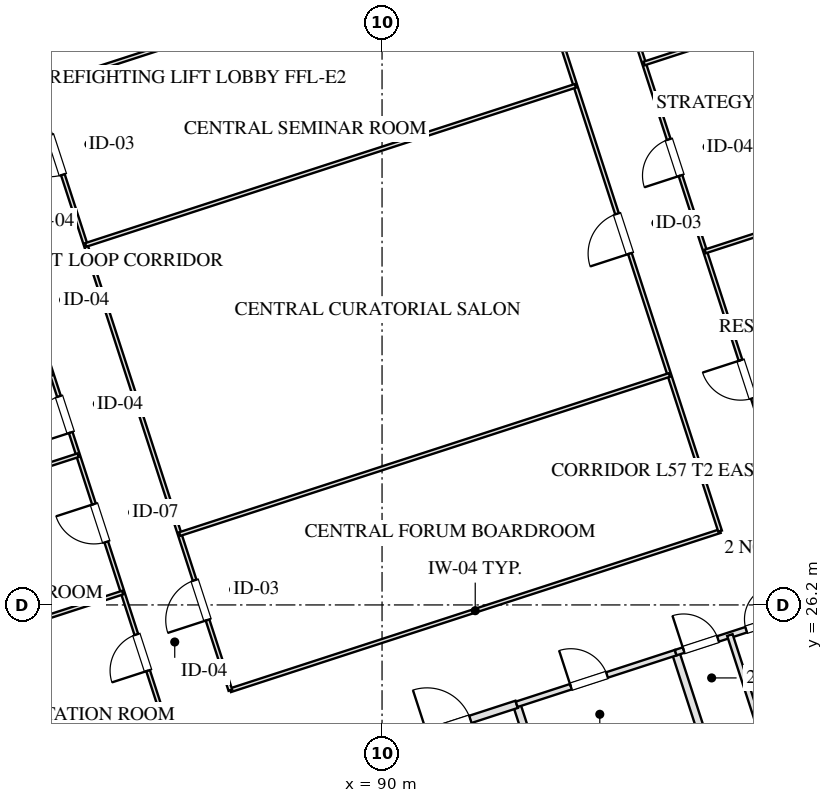
"""IFC4 building model, lengths in metres.
Left out: names, types, materials, properties, quantities, classifications, styles, units other than length and angle.
Written with IfcOpenShell. Run it as: python <this file> out.ifc"""

import sys

from ifc_helpers import new_model, si_unit, direction, frame, frame_2d, origin, place, context, subcontext, project, spatial, rectangle, extrude, element, fill, save


model = new_model("IFC4")
c1 = context("Model", 3, precision=1e-05, world=origin(), true_north=direction((0.0, 1.0)))
c2 = subcontext(c1, "Body", "Model", "MODEL_VIEW")
j1 = project(units=[si_unit("LENGTHUNIT", "METRE"), si_unit("PLANEANGLEUNIT", "RADIAN")], contexts=[c1])
p1 = place(None, origin())
s1 = spatial("IfcSite", under=j1, at=p1, CompositionType="ELEMENT")
p2 = place(p1, origin())
s2 = spatial("IfcBuilding", under=s1, at=p2, CompositionType="ELEMENT")
p3 = place(p2, frame((0.0, 0.0, 212.75)))
s3 = spatial("IfcBuildingStorey", under=s2, at=p3, CompositionType="ELEMENT", Elevation=212.75)
p4 = place(p3, frame((82.618, 11.414, 0.0), z_axis=(0.0, 0.0, 1.0), x_axis=(-0.309016491071, 0.951056679828, 0.0)))
e1 = element("IfcWall", 1, at=p4, inside=s3, PredefinedType="SOLIDWALL", context=c2, shape_type="SweptSolid", body=[
    extrude(rectangle(XDim=38.4, YDim=0.4, at=frame_2d((19.2, 0.0))), origin(), (0.0, 0.0, 1.0), 2.55),
])
p5 = place(p4, frame((11.75, 0.0, 0.75)))
e2 = element("IfcOpeningElement", 2, at=p5, cuts=e1, PredefinedType="OPENING", context=c2, shape_type="SweptSolid", body=[
    extrude(rectangle(XDim=2.1, YDim=1.4, at=frame_2d((1.05, 0.7))), frame((0.0, 0.21, 0.0), z_axis=(0.0, -1.0, 0.0), x_axis=(1.0, 0.0, 0.0)), (0.0, 0.0, 1.0), 0.42),
])
p6 = place(p4, frame((15.55, 0.0, 0.75)))
e3 = element("IfcOpeningElement", 3, at=p6, cuts=e1, PredefinedType="OPENING", context=c2, shape_type="SweptSolid", body=[
    extrude(rectangle(XDim=2.1, YDim=1.4, at=frame_2d((1.05, 0.7))), frame((0.0, 0.21, 0.0), z_axis=(0.0, -1.0, 0.0), x_axis=(1.0, 0.0, 0.0)), (0.0, 0.0, 1.0), 0.42),
])
p7 = place(p4, frame((20.75, 0.0, 0.75)))
e4 = element("IfcOpeningElement", 4, at=p7, cuts=e1, PredefinedType="OPENING", context=c2, shape_type="SweptSolid", body=[
    extrude(rectangle(XDim=2.1, YDim=1.4, at=frame_2d((1.05, 0.7))), frame((0.0, 0.21, 0.0), z_axis=(0.0, -1.0, 0.0), x_axis=(1.0, 0.0, 0.0)), (0.0, 0.0, 1.0), 0.42),
])
p8 = place(p4, frame((24.55, 0.0, 0.75)))
e5 = element("IfcOpeningElement", 5, at=p8, cuts=e1, PredefinedType="OPENING", context=c2, shape_type="SweptSolid", body=[
    extrude(rectangle(XDim=2.1, YDim=1.4, at=frame_2d((1.05, 0.7))), frame((0.0, 0.21, 0.0), z_axis=(0.0, -1.0, 0.0), x_axis=(1.0, 0.0, 0.0)), (0.0, 0.0, 1.0), 0.42),
])
p9 = place(p3, frame((97.382, 56.586, 0.0), z_axis=(0.0, 0.0, 1.0), x_axis=(0.309016491071, -0.951056679828, 0.0)))
e6 = element("IfcWall", 6, at=p9, inside=s3, PredefinedType="SOLIDWALL", context=c2, shape_type="SweptSolid", body=[
    extrude(rectangle(XDim=38.4, YDim=0.4, at=frame_2d((19.2, 0.0))), origin(), (0.0, 0.0, 1.0), 2.55),
])
p10 = place(p9, frame((24.55, 0.0, 0.75)))
e7 = element("IfcOpeningElement", 7, at=p10, cuts=e6, PredefinedType="OPENING", context=c2, shape_type="SweptSolid", body=[
    extrude(rectangle(XDim=2.1, YDim=1.4, at=frame_2d((1.05, 0.7))), frame((0.0, 0.21, 0.0), z_axis=(0.0, -1.0, 0.0), x_axis=(1.0, 0.0, 0.0)), (0.0, 0.0, 1.0), 0.42),
])
p11 = place(p9, frame((20.75, 0.0, 0.75)))
e8 = element("IfcOpeningElement", 8, at=p11, cuts=e6, PredefinedType="OPENING", context=c2, shape_type="SweptSolid", body=[
    extrude(rectangle(XDim=2.1, YDim=1.4, at=frame_2d((1.05, 0.7))), frame((0.0, 0.21, 0.0), z_axis=(0.0, -1.0, 0.0), x_axis=(1.0, 0.0, 0.0)), (0.0, 0.0, 1.0), 0.42),
])
p12 = place(p9, frame((15.55, 0.0, 0.75)))
e9 = element("IfcOpeningElement", 9, at=p12, cuts=e6, PredefinedType="OPENING", context=c2, shape_type="SweptSolid", body=[
    extrude(rectangle(XDim=2.1, YDim=1.4, at=frame_2d((1.05, 0.7))), frame((0.0, 0.21, 0.0), z_axis=(0.0, -1.0, 0.0), x_axis=(1.0, 0.0, 0.0)), (0.0, 0.0, 1.0), 0.42),
])
p13 = place(p9, frame((11.75, 0.0, 0.75)))
e10 = element("IfcOpeningElement", 10, at=p13, cuts=e6, PredefinedType="OPENING", context=c2, shape_type="SweptSolid", body=[
    extrude(rectangle(XDim=2.1, YDim=1.4, at=frame_2d((1.05, 0.7))), frame((0.0, 0.21, 0.0), z_axis=(0.0, -1.0, 0.0), x_axis=(1.0, 0.0, 0.0)), (0.0, 0.0, 1.0), 0.42),
])
p14 = place(p3, frame((93.542, 23.585, 0.0), z_axis=(0.0, 0.0, 1.0), x_axis=(0.309042196757, -0.951048327176, 0.0)))
e11 = element("IfcWall", 11, at=p14, inside=s3, PredefinedType="PARTITIONING", context=c2, shape_type="SweptSolid", body=[
    extrude(rectangle(XDim=8.43, YDim=0.2, at=frame_2d((4.215, 0.0))), origin(), (0.0, 0.0, 1.0), 3.155),
])
p15 = place(p3, frame((89.899, 22.401, 0.0), z_axis=(0.0, 0.0, 1.0), x_axis=(0.951046716504, 0.309047153403, 0.0)))
e12 = element("IfcWall", 12, at=p15, inside=s3, PredefinedType="PARTITIONING", context=c2, shape_type="SweptSolid", body=[
    extrude(rectangle(XDim=3.83, YDim=0.2, at=frame_2d((1.915, 0.0))), origin(), (0.0, 0.0, 1.0), 3.155),
])
p16 = place(p15, frame((1.35, 0.0, 0.0)))
e13 = element("IfcOpeningElement", 13, at=p16, cuts=e12, PredefinedType="OPENING", context=c2, shape_type="SweptSolid", body=[
    extrude(rectangle(XDim=1.2, YDim=2.05, at=frame_2d((0.6, 1.025))), frame((0.0, 0.11, 0.0), z_axis=(0.0, -1.0, 0.0), x_axis=(1.0, 0.0, 0.0)), (0.0, 0.0, 1.0), 0.22),
])
p17 = place(p3, frame((97.727, 24.944, 0.0), z_axis=(0.0, 0.0, 1.0), x_axis=(0.309016001439, -0.951056838919, 0.0)))
e14 = element("IfcWall", 14, at=p17, inside=s3, PredefinedType="PARTITIONING", context=c2, shape_type="SweptSolid", body=[
    extrude(rectangle(XDim=8.43, YDim=0.2, at=frame_2d((4.215, 0.0))), origin(), (0.0, 0.0, 1.0), 3.155),
])
p18 = place(p3, frame((93.542, 23.585, 0.0), z_axis=(0.0, 0.0, 1.0), x_axis=(0.951063829732, 0.308994485023, 0.0)))
e15 = element("IfcWall", 15, at=p18, inside=s3, PredefinedType="PARTITIONING", context=c2, shape_type="SweptSolid", body=[
    extrude(rectangle(XDim=4.4, YDim=0.15, at=frame_2d((2.2, 0.0))), origin(), (0.0, 0.0, 1.0), 3.155),
])
p19 = place(p18, frame((1.5, 0.0, 0.0)))
e16 = element("IfcOpeningElement", 16, at=p19, cuts=e15, PredefinedType="OPENING", context=c2, shape_type="SweptSolid", body=[
    extrude(rectangle(XDim=1.0, YDim=2.05, at=frame_2d((0.5, 1.025))), frame((0.0, 0.085, 0.0), z_axis=(0.0, -1.0, 0.0), x_axis=(1.0, 0.0, 0.0)), (0.0, 0.0, 1.0), 0.17),
])
p20 = place(p3, frame((97.727, 24.944, 0.0), z_axis=(0.0, 0.0, 1.0), x_axis=(0.951036872128, 0.309077446369, 0.0)))
e17 = element("IfcWall", 17, at=p20, inside=s3, PredefinedType="PARTITIONING", context=c2, shape_type="SweptSolid", body=[
    extrude(rectangle(XDim=3.2, YDim=0.15, at=frame_2d((1.6, 0.0))), origin(), (0.0, 0.0, 1.0), 3.155),
])
p21 = place(p20, frame((0.22, 0.0, 0.0)))
e18 = element("IfcOpeningElement", 18, at=p21, cuts=e17, PredefinedType="OPENING", context=c2, shape_type="SweptSolid", body=[
    extrude(rectangle(XDim=0.95, YDim=2.05, at=frame_2d((0.475, 1.025))), frame((0.0, 0.085, 0.0), z_axis=(0.0, -1.0, 0.0), x_axis=(1.0, 0.0, 0.0)), (0.0, 0.0, 1.0), 0.17),
])
p22 = place(p20, frame((1.95, 0.0, 0.0)))
e19 = element("IfcOpeningElement", 19, at=p22, cuts=e17, PredefinedType="OPENING", context=c2, shape_type="SweptSolid", body=[
    extrude(rectangle(XDim=0.9, YDim=2.05, at=frame_2d((0.45, 1.025))), frame((0.0, 0.085, 0.0), z_axis=(0.0, -1.0, 0.0), x_axis=(1.0, 0.0, 0.0)), (0.0, 0.0, 1.0), 0.17),
])
p23 = place(p3, frame((99.153, 25.408, 0.0), z_axis=(0.0, 0.0, 1.0), x_axis=(0.309016001439, -0.951056838919, 0.0)))
e20 = element("IfcWall", 20, at=p23, inside=s3, PredefinedType="PARTITIONING", context=c2, shape_type="SweptSolid", body=[
    extrude(rectangle(XDim=8.43, YDim=0.15, at=frame_2d((4.215, 0.0))), origin(), (0.0, 0.0, 1.0), 3.155),
])
p24 = place(p23, frame((2.55, 0.0, 0.0)))
e21 = element("IfcOpeningElement", 21, at=p24, cuts=e20, PredefinedType="OPENING", context=c2, shape_type="SweptSolid", body=[
    extrude(rectangle(XDim=0.95, YDim=2.05, at=frame_2d((0.475, 1.025))), frame((0.0, 0.085, 0.0), z_axis=(0.0, -1.0, 0.0), x_axis=(1.0, 0.0, 0.0)), (0.0, 0.0, 1.0), 0.17),
])
p25 = place(p23, frame((5.6, 0.0, 0.0)))
e22 = element("IfcOpeningElement", 22, at=p25, cuts=e20, PredefinedType="OPENING", context=c2, shape_type="SweptSolid", body=[
    extrude(rectangle(XDim=0.9, YDim=2.05, at=frame_2d((0.45, 1.025))), frame((0.0, 0.085, 0.0), z_axis=(0.0, -1.0, 0.0), x_axis=(1.0, 0.0, 0.0)), (0.0, 0.0, 1.0), 0.17),
])
p26 = place(p3, frame((79.447, 21.823, 0.0), z_axis=(0.0, 0.0, 1.0), x_axis=(0.951048779938, 0.309040803421, 0.0)))
e23 = element("IfcWall", 23, at=p26, inside=s3, PredefinedType="MOVABLE", context=c2, shape_type="SweptSolid", body=[
    extrude(rectangle(XDim=5.0, YDim=0.1, at=frame_2d((2.5, 0.0))), origin(), (0.0, 0.0, 1.0), 3.155),
])
p27 = place(p3, frame((86.009, 23.955, 0.0), z_axis=(0.0, 0.0, 1.0), x_axis=(0.951059488241, 0.309007847517, 0.0)))
e24 = element("IfcWall", 24, at=p27, inside=s3, PredefinedType="MOVABLE", context=c2, shape_type="SweptSolid", body=[
    extrude(rectangle(XDim=13.55, YDim=0.1, at=frame_2d((6.775, 0.0))), origin(), (0.0, 0.0, 1.0), 3.155),
])
p28 = place(p3, frame((80.867, 39.781, 0.0), z_axis=(0.0, 0.0, 1.0), x_axis=(0.951054192928, 0.309024144872, 0.0)))
e25 = element("IfcWall", 25, at=p28, inside=s3, PredefinedType="MOVABLE", context=c2, shape_type="SweptSolid", body=[
    extrude(rectangle(XDim=13.55, YDim=0.1, at=frame_2d((6.775, 0.0))), origin(), (0.0, 0.0, 1.0), 3.155),
])
p29 = place(p3, frame((84.202, 23.368, 0.0), z_axis=(0.0, 0.0, 1.0), x_axis=(-0.309022042254, 0.951054876125, 0.0)))
e26 = element("IfcWall", 26, at=p29, inside=s3, PredefinedType="MOVABLE", context=c2, shape_type="SweptSolid", body=[
    extrude(rectangle(XDim=16.64, YDim=0.1, at=frame_2d((8.32, 0.0))), origin(), (0.0, 0.0, 1.0), 3.155),
])
p30 = place(p29, frame((1.16, 0.0, 0.0)))
e27 = element("IfcOpeningElement", 27, at=p30, cuts=e26, PredefinedType="OPENING", context=c2, shape_type="SweptSolid", body=[
    extrude(rectangle(XDim=1.0, YDim=2.05, at=frame_2d((0.5, 1.025))), frame((0.0, 0.06, 0.0), z_axis=(0.0, -1.0, 0.0), x_axis=(1.0, 0.0, 0.0)), (0.0, 0.0, 1.0), 0.12),
])
p31 = place(p29, frame((4.72, 0.0, 0.0)))
e28 = element("IfcOpeningElement", 28, at=p31, cuts=e26, PredefinedType="OPENING", context=c2, shape_type="SweptSolid", body=[
    extrude(rectangle(XDim=1.05, YDim=2.05, at=frame_2d((0.525, 1.025))), frame((0.0, 0.06, 0.0), z_axis=(0.0, -1.0, 0.0), x_axis=(1.0, 0.0, 0.0)), (0.0, 0.0, 1.0), 0.12),
])
p32 = place(p29, frame((7.748, 0.0, 0.0)))
e29 = element("IfcOpeningElement", 29, at=p32, cuts=e26, PredefinedType="OPENING", context=c2, shape_type="SweptSolid", body=[
    extrude(rectangle(XDim=1.0, YDim=2.05, at=frame_2d((0.5, 1.025))), frame((0.0, 0.06, 0.0), z_axis=(0.0, -1.0, 0.0), x_axis=(1.0, 0.0, 0.0)), (0.0, 0.0, 1.0), 0.12),
])
p33 = place(p29, frame((10.623, 0.0, 0.0)))
e30 = element("IfcOpeningElement", 30, at=p33, cuts=e26, PredefinedType="OPENING", context=c2, shape_type="SweptSolid", body=[
    extrude(rectangle(XDim=1.0, YDim=2.05, at=frame_2d((0.5, 1.025))), frame((0.0, 0.06, 0.0), z_axis=(0.0, -1.0, 0.0), x_axis=(1.0, 0.0, 0.0)), (0.0, 0.0, 1.0), 0.12),
])
p34 = place(p29, frame((14.255, 0.0, 0.0)))
e31 = element("IfcOpeningElement", 31, at=p34, cuts=e26, PredefinedType="OPENING", context=c2, shape_type="SweptSolid", body=[
    extrude(rectangle(XDim=1.0, YDim=2.05, at=frame_2d((0.5, 1.025))), frame((0.0, 0.06, 0.0), z_axis=(0.0, -1.0, 0.0), x_axis=(1.0, 0.0, 0.0)), (0.0, 0.0, 1.0), 0.12),
])
p35 = place(p3, frame((86.009, 23.955, 0.0), z_axis=(0.0, 0.0, 1.0), x_axis=(-0.309022042254, 0.951054876125, 0.0)))
e32 = element("IfcWall", 32, at=p35, inside=s3, PredefinedType="MOVABLE", context=c2, shape_type="SweptSolid", body=[
    extrude(rectangle(XDim=16.64, YDim=0.1, at=frame_2d((8.32, 0.0))), origin(), (0.0, 0.0, 1.0), 3.155),
])
p36 = place(p35, frame((1.944, 0.0, 0.0)))
e33 = element("IfcOpeningElement", 33, at=p36, cuts=e32, PredefinedType="OPENING", context=c2, shape_type="SweptSolid", body=[
    extrude(rectangle(XDim=1.1, YDim=2.05, at=frame_2d((0.55, 1.025))), frame((0.0, 0.06, 0.0), z_axis=(0.0, -1.0, 0.0), x_axis=(1.0, 0.0, 0.0)), (0.0, 0.0, 1.0), 0.12),
])
p37 = place(p35, frame((14.264, 0.0, 0.0)))
e34 = element("IfcOpeningElement", 34, at=p37, cuts=e32, PredefinedType="OPENING", context=c2, shape_type="SweptSolid", body=[
    extrude(rectangle(XDim=1.1, YDim=2.05, at=frame_2d((0.55, 1.025))), frame((0.0, 0.06, 0.0), z_axis=(0.0, -1.0, 0.0), x_axis=(1.0, 0.0, 0.0)), (0.0, 0.0, 1.0), 0.12),
])
p38 = place(p3, frame((98.896, 28.142, 0.0), z_axis=(0.0, 0.0, 1.0), x_axis=(-0.30901773025, 0.951056277195, 0.0)))
e35 = element("IfcWall", 35, at=p38, inside=s3, PredefinedType="MOVABLE", context=c2, shape_type="SweptSolid", body=[
    extrude(rectangle(XDim=16.64, YDim=0.1, at=frame_2d((8.32, 0.0))), origin(), (0.0, 0.0, 1.0), 3.155),
])
p39 = place(p38, frame((7.68, 0.0, 0.0)))
e36 = element("IfcOpeningElement", 36, at=p39, cuts=e35, PredefinedType="OPENING", context=c2, shape_type="SweptSolid", body=[
    extrude(rectangle(XDim=1.1, YDim=2.05, at=frame_2d((0.55, 1.025))), frame((0.0, 0.06, 0.0), z_axis=(0.0, -1.0, 0.0), x_axis=(1.0, 0.0, 0.0)), (0.0, 0.0, 1.0), 0.12),
])
p40 = place(p3, frame((100.703, 28.729, 0.0), z_axis=(0.0, 0.0, 1.0), x_axis=(-0.30901773025, 0.951056277195, 0.0)))
e37 = element("IfcWall", 37, at=p40, inside=s3, PredefinedType="MOVABLE", context=c2, shape_type="SweptSolid", body=[
    extrude(rectangle(XDim=16.64, YDim=0.1, at=frame_2d((8.32, 0.0))), origin(), (0.0, 0.0, 1.0), 3.155),
])
p41 = place(p40, frame((3.06, 0.0, 0.0)))
e38 = element("IfcOpeningElement", 38, at=p41, cuts=e37, PredefinedType="OPENING", context=c2, shape_type="SweptSolid", body=[
    extrude(rectangle(XDim=1.05, YDim=2.05, at=frame_2d((0.525, 1.025))), frame((0.0, 0.06, 0.0), z_axis=(0.0, -1.0, 0.0), x_axis=(1.0, 0.0, 0.0)), (0.0, 0.0, 1.0), 0.12),
])
p42 = place(p40, frame((9.22, 0.0, 0.0)))
e39 = element("IfcOpeningElement", 39, at=p42, cuts=e37, PredefinedType="OPENING", context=c2, shape_type="SweptSolid", body=[
    extrude(rectangle(XDim=1.0, YDim=2.05, at=frame_2d((0.5, 1.025))), frame((0.0, 0.06, 0.0), z_axis=(0.0, -1.0, 0.0), x_axis=(1.0, 0.0, 0.0)), (0.0, 0.0, 1.0), 0.12),
])
p43 = place(p40, frame((13.98, 0.0, 0.0)))
e40 = element("IfcOpeningElement", 40, at=p43, cuts=e37, PredefinedType="OPENING", context=c2, shape_type="SweptSolid", body=[
    extrude(rectangle(XDim=1.0, YDim=2.05, at=frame_2d((0.5, 1.025))), frame((0.0, 0.06, 0.0), z_axis=(0.0, -1.0, 0.0), x_axis=(1.0, 0.0, 0.0)), (0.0, 0.0, 1.0), 0.12),
])
p44 = place(p3, frame((84.674, 28.063, 0.0), z_axis=(0.0, 0.0, 1.0), x_axis=(0.951054192928, 0.309024144872, 0.0)))
e41 = element("IfcWall", 41, at=p44, inside=s3, PredefinedType="MOVABLE", context=c2, shape_type="SweptSolid", body=[
    extrude(rectangle(XDim=13.55, YDim=0.1, at=frame_2d((6.775, 0.0))), origin(), (0.0, 0.0, 1.0), 3.155),
])
p45 = place(p3, frame((82.202, 35.672, 0.0), z_axis=(0.0, 0.0, 1.0), x_axis=(0.951059488241, 0.309007847517, 0.0)))
e42 = element("IfcWall", 42, at=p45, inside=s3, PredefinedType="MOVABLE", context=c2, shape_type="SweptSolid", body=[
    extrude(rectangle(XDim=13.55, YDim=0.1, at=frame_2d((6.775, 0.0))), origin(), (0.0, 0.0, 1.0), 3.155),
])
p46 = place(p3, frame((78.42, 24.98, 0.0), z_axis=(0.0, 0.0, 1.0), x_axis=(0.951053443117, 0.309026452484, 0.0)))
e43 = element("IfcWall", 43, at=p46, inside=s3, PredefinedType="MOVABLE", context=c2, shape_type="SweptSolid", body=[
    extrude(rectangle(XDim=5.0, YDim=0.1, at=frame_2d((2.5, 0.0))), origin(), (0.0, 0.0, 1.0), 3.155),
])
p47 = place(p3, frame((77.246, 28.594, 0.0), z_axis=(0.0, 0.0, 1.0), x_axis=(0.951048779938, 0.309040803421, 0.0)))
e44 = element("IfcWall", 44, at=p47, inside=s3, PredefinedType="MOVABLE", context=c2, shape_type="SweptSolid", body=[
    extrude(rectangle(XDim=5.0, YDim=0.1, at=frame_2d((2.5, 0.0))), origin(), (0.0, 0.0, 1.0), 3.155),
])
for number, where, z_axis, x_axis in (
    (45, (98.502, 35.501, 0.0), (0.0, 0.0, 1.0), (0.951, 0.309, 0.0)),
    (46, (96.896, 40.446, 0.0), (0.0, 0.0, 1.0), (0.951, 0.309, 0.0)),
):
    element("IfcWall", number, at=place(p3, frame(where, z_axis=z_axis, x_axis=x_axis)), inside=s3, PredefinedType="MOVABLE", context=c2, shape_type="SweptSolid", body=[
        extrude(rectangle(XDim=5.25, YDim=0.1, at=frame_2d((2.625, 0.0))), origin(), (0.0, 0.0, 1.0), 3.155),
    ])
p48 = place(p16, origin())
e47 = element("IfcDoor", 47, at=p48, inside=s3, OperationType="SINGLE_SWING_LEFT", PredefinedType="DOOR", context=c2, shape_type="SweptSolid", body=[
    extrude(rectangle(XDim=1.2, YDim=2.05, at=frame_2d((0.6, 1.025))), frame((0.0, 0.025, 0.0), z_axis=(0.0, -1.0, 0.0), x_axis=(1.0, 0.0, 0.0)), (0.0, 0.0, 1.0), 0.05),
])
fill(e13, e47)
p49 = place(p19, origin())
e48 = element("IfcDoor", 48, at=p49, inside=s3, OperationType="SINGLE_SWING_LEFT", PredefinedType="DOOR", context=c2, shape_type="SweptSolid", body=[
    extrude(rectangle(XDim=1.0, YDim=2.05, at=frame_2d((0.5, 1.025))), frame((0.0, 0.025, 0.0), z_axis=(0.0, -1.0, 0.0), x_axis=(1.0, 0.0, 0.0)), (0.0, 0.0, 1.0), 0.05),
])
fill(e16, e48)
p50 = place(p21, origin())
e49 = element("IfcDoor", 49, at=p50, inside=s3, OperationType="SINGLE_SWING_LEFT", PredefinedType="DOOR", context=c2, shape_type="SweptSolid", body=[
    extrude(rectangle(XDim=0.95, YDim=2.05, at=frame_2d((0.475, 1.025))), frame((0.0, 0.025, 0.0), z_axis=(0.0, -1.0, 0.0), x_axis=(1.0, 0.0, 0.0)), (0.0, 0.0, 1.0), 0.05),
])
fill(e18, e49)
p51 = place(p22, origin())
e50 = element("IfcDoor", 50, at=p51, inside=s3, OperationType="SINGLE_SWING_RIGHT", PredefinedType="DOOR", context=c2, shape_type="SweptSolid", body=[
    extrude(rectangle(XDim=0.9, YDim=2.05, at=frame_2d((0.45, 1.025))), frame((0.0, 0.025, 0.0), z_axis=(0.0, -1.0, 0.0), x_axis=(1.0, 0.0, 0.0)), (0.0, 0.0, 1.0), 0.05),
])
fill(e19, e50)
p52 = place(p30, origin())
e51 = element("IfcDoor", 51, at=p52, inside=s3, OperationType="SINGLE_SWING_LEFT", PredefinedType="DOOR", context=c2, shape_type="SweptSolid", body=[
    extrude(rectangle(XDim=1.0, YDim=2.05, at=frame_2d((0.5, 1.025))), frame((0.0, 0.025, 0.0), z_axis=(0.0, -1.0, 0.0), x_axis=(1.0, 0.0, 0.0)), (0.0, 0.0, 1.0), 0.05),
])
fill(e27, e51)
p53 = place(p31, origin())
e52 = element("IfcDoor", 52, at=p53, inside=s3, OperationType="SINGLE_SWING_RIGHT", PredefinedType="DOOR", context=c2, shape_type="SweptSolid", body=[
    extrude(rectangle(XDim=1.05, YDim=2.05, at=frame_2d((0.525, 1.025))), frame((0.0, 0.025, 0.0), z_axis=(0.0, -1.0, 0.0), x_axis=(1.0, 0.0, 0.0)), (0.0, 0.0, 1.0), 0.05),
])
fill(e28, e52)
p54 = place(p32, origin())
e53 = element("IfcDoor", 53, at=p54, inside=s3, OperationType="SINGLE_SWING_LEFT", PredefinedType="DOOR", context=c2, shape_type="SweptSolid", body=[
    extrude(rectangle(XDim=1.0, YDim=2.05, at=frame_2d((0.5, 1.025))), frame((0.0, 0.025, 0.0), z_axis=(0.0, -1.0, 0.0), x_axis=(1.0, 0.0, 0.0)), (0.0, 0.0, 1.0), 0.05),
])
fill(e29, e53)
p55 = place(p36, origin())
e54 = element("IfcDoor", 54, at=p55, inside=s3, OperationType="SINGLE_SWING_LEFT", PredefinedType="DOOR", context=c2, shape_type="SweptSolid", body=[
    extrude(rectangle(XDim=1.1, YDim=2.05, at=frame_2d((0.55, 1.025))), frame((0.0, 0.025, 0.0), z_axis=(0.0, -1.0, 0.0), x_axis=(1.0, 0.0, 0.0)), (0.0, 0.0, 1.0), 0.05),
])
fill(e33, e54)
p56 = place(p37, origin())
e55 = element("IfcDoor", 55, at=p56, inside=s3, OperationType="SINGLE_SWING_RIGHT", PredefinedType="DOOR", context=c2, shape_type="SweptSolid", body=[
    extrude(rectangle(XDim=1.1, YDim=2.05, at=frame_2d((0.55, 1.025))), frame((0.0, 0.025, 0.0), z_axis=(0.0, -1.0, 0.0), x_axis=(1.0, 0.0, 0.0)), (0.0, 0.0, 1.0), 0.05),
])
fill(e34, e55)
p57 = place(p39, origin())
e56 = element("IfcDoor", 56, at=p57, inside=s3, OperationType="SINGLE_SWING_LEFT", PredefinedType="DOOR", context=c2, shape_type="SweptSolid", body=[
    extrude(rectangle(XDim=1.1, YDim=2.05, at=frame_2d((0.55, 1.025))), frame((0.0, 0.025, 0.0), z_axis=(0.0, -1.0, 0.0), x_axis=(1.0, 0.0, 0.0)), (0.0, 0.0, 1.0), 0.05),
])
fill(e36, e56)
p58 = place(p41, origin())
e57 = element("IfcDoor", 57, at=p58, inside=s3, OperationType="SINGLE_SWING_RIGHT", PredefinedType="DOOR", context=c2, shape_type="SweptSolid", body=[
    extrude(rectangle(XDim=1.05, YDim=2.05, at=frame_2d((0.525, 1.025))), frame((0.0, 0.025, 0.0), z_axis=(0.0, -1.0, 0.0), x_axis=(1.0, 0.0, 0.0)), (0.0, 0.0, 1.0), 0.05),
])
fill(e38, e57)
p59 = place(p42, origin())
e58 = element("IfcDoor", 58, at=p59, inside=s3, OperationType="SINGLE_SWING_LEFT", PredefinedType="DOOR", context=c2, shape_type="SweptSolid", body=[
    extrude(rectangle(XDim=1.0, YDim=2.05, at=frame_2d((0.5, 1.025))), frame((0.0, 0.025, 0.0), z_axis=(0.0, -1.0, 0.0), x_axis=(1.0, 0.0, 0.0)), (0.0, 0.0, 1.0), 0.05),
])
fill(e39, e58)
save(model, sys.argv[1])
